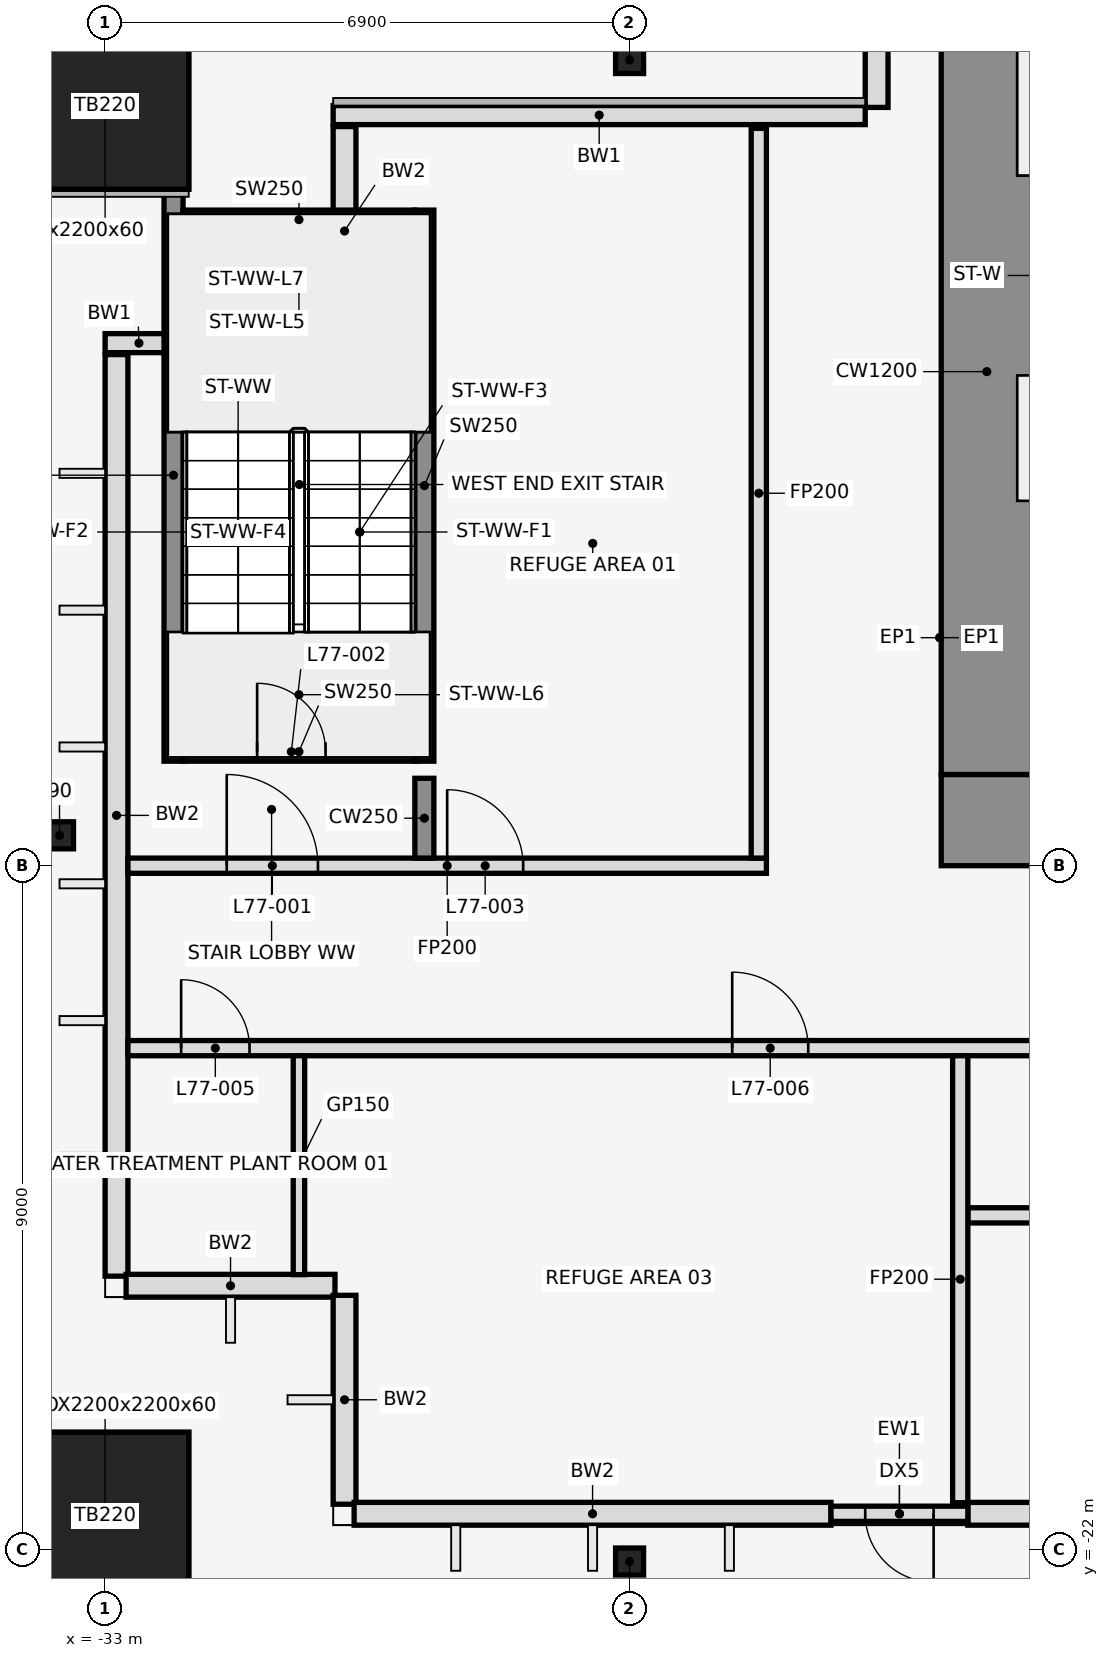
"""IFC4 building model, lengths in metres.
Left out: names, types, materials, properties, quantities, classifications, styles, units other than length and angle.
Written with IfcOpenShell. Run it as: python <this file> out.ifc"""

import sys

from ifc_helpers import new_model, si_unit, direction, frame, frame_2d, origin, origin_2d, place, context, subcontext, project, spatial, rectangle, hollow_rectangle, i_section, extrude, element, fill, save


model = new_model("IFC4")
c1 = context("Model", 3, precision=1e-05, world=origin(), true_north=direction((0.0, 1.0)))
c2 = subcontext(c1, "Body", "Model", "MODEL_VIEW")
j1 = project(units=[si_unit("LENGTHUNIT", "METRE"), si_unit("PLANEANGLEUNIT", "RADIAN")], contexts=[c1])
p1 = place(None, origin())
s1 = spatial("IfcSite", under=j1, at=p1, CompositionType="ELEMENT")
p2 = place(p1, origin())
s2 = spatial("IfcBuilding", under=s1, at=p2, CompositionType="ELEMENT")
p3 = place(p2, frame((0.0, 0.0, 342.5)))
s3 = spatial("IfcBuildingStorey", under=s2, at=p3, CompositionType="ELEMENT", Elevation=342.5)
for number, where, z_axis, x_axis in (
    (1, (-33.0, -21.554, 0.0), (0.0, 0.0, 1.0), (1.0, 0.0, 0.0)),
    (2, (-33.0, -3.0, 0.0), (0.0, 0.0, 1.0), (1.0, 0.0, 0.0)),
):
    element("IfcColumn", number, at=place(p3, frame(where, z_axis=z_axis, x_axis=x_axis)), inside=s3, PredefinedType="COLUMN", context=c2, shape_type="SweptSolid", body=[
        extrude(hollow_rectangle(XDim=2.2, YDim=2.2, WallThickness=0.06, at=origin_2d()), origin(), (0.0, 0.0, 1.0), 4.98),
    ])
for number, where, z_axis, x_axis in (
    (3, (-26.1, -22.154, 0.0), (0.0, 0.0, 1.0), (1.0, 0.0, 0.0)),
    (4, (-26.1, -2.4, 0.0), (0.0, 0.0, 1.0), (1.0, 0.0, 0.0)),
    (5, (-33.6, -12.6, 0.0), (0.0, 0.0, 1.0), (1.0, 0.0, 0.0)),
):
    element("IfcColumn", number, at=place(p3, frame(where, z_axis=z_axis, x_axis=x_axis)), inside=s3, PredefinedType="COLUMN", context=c2, shape_type="SweptSolid", body=[
        extrude(i_section(OverallWidth=0.368, OverallDepth=0.356, WebThickness=0.011, FlangeThickness=0.018, at=origin_2d()), origin(), (0.0, 0.0, 1.0), 5.4),
    ])
for number, where, z_axis, x_axis in (
    (6, (-33.0, -21.554, 4.98), (0.0, 0.0, 1.0), (1.0, 0.0, 0.0)),
    (7, (-33.0, -3.0, 4.98), (0.0, 0.0, 1.0), (1.0, 0.0, 0.0)),
):
    element("IfcColumn", number, at=place(p3, frame(where, z_axis=z_axis, x_axis=x_axis)), inside=s3, PredefinedType="COLUMN", context=c2, shape_type="SweptSolid", body=[
        extrude(rectangle(XDim=2.2, YDim=2.2, at=origin_2d()), origin(), (0.0, 0.0, 1.0), 0.42),
    ])
for number, where, z_axis, x_axis in (
    (8, (-22.85, -0.276, 0.0), (0.0, 0.0, 1.0), (0.0, -1.0, 0.0)),
    (9, (-29.85, -3.276, 0.0), (0.0, 0.0, 1.0), (0.0, -1.0, 0.0)),
):
    element("IfcWall", number, at=place(p3, frame(where, z_axis=z_axis, x_axis=x_axis)), inside=s3, PredefinedType="STANDARD", context=c2, shape_type="SweptSolid", body=[
        extrude(rectangle(XDim=2.748, YDim=0.3, at=frame_2d((1.374, 0.0))), origin(), (0.0, 0.0, 1.0), 5.2),
    ])
p4 = place(p3, frame((-32.85, -6.276, 0.0), z_axis=(0.0, 0.0, 1.0), x_axis=(0.0, -1.0, 0.0)))
e10 = element("IfcWall", 10, at=p4, inside=s3, PredefinedType="STANDARD", context=c2, shape_type="SweptSolid", body=[
    extrude(rectangle(XDim=12.124, YDim=0.3, at=frame_2d((6.062, 0.0))), origin(), (0.0, 0.0, 1.0), 4.288),
])
for number, where, z_axis, x_axis in (
    (11, (-32.724, -18.526, 0.0), (0.0, 0.0, 1.0), (1.0, 0.0, 0.0)),
    (12, (-29.85, -18.652, 0.0), (0.0, 0.0, 1.0), (0.0, -1.0, 0.0)),
):
    element("IfcWall", number, at=place(p3, frame(where, z_axis=z_axis, x_axis=x_axis)), inside=s3, PredefinedType="STANDARD", context=c2, shape_type="SweptSolid", body=[
        extrude(rectangle(XDim=2.748, YDim=0.3, at=frame_2d((1.374, 0.0))), origin(), (0.0, 0.0, 1.0), 4.796),
    ])
p5 = place(p3, frame((-29.724, -21.526, 0.0), z_axis=(0.0, 0.0, 1.0), x_axis=(1.0, 0.0, 0.0)))
e13 = element("IfcWall", 13, at=p5, inside=s3, PredefinedType="STANDARD", context=c2, shape_type="SweptSolid", body=[
    extrude(rectangle(XDim=6.274, YDim=0.3, at=frame_2d((3.137, 0.0))), origin(), (0.0, 0.0, 1.0), 4.796),
])
p6 = place(p3, frame((-21.65, -21.526, 0.0), z_axis=(0.0, 0.0, 1.0), x_axis=(1.0, 0.0, 0.0)))
e14 = element("IfcWall", 14, at=p6, inside=s3, PredefinedType="STANDARD", context=c2, shape_type="SweptSolid", body=[
    extrude(rectangle(XDim=6.035, YDim=0.3, at=frame_2d((3.018, 0.0))), origin(), (0.0, 0.0, 1.0), 4.745),
])
p7 = place(p3, frame((-21.65, -21.526, 0.0), z_axis=(0.0, 0.0, 1.0), x_axis=(-1.0, 0.0, 0.0)))
e15 = element("IfcWall", 15, at=p7, inside=s3, PredefinedType="STANDARD", context=c2, shape_type="SweptSolid", body=[
    extrude(rectangle(XDim=1.8, YDim=0.2, at=frame_2d((0.9, 0.0))), origin(), (0.0, 0.0, 1.0), 5.2),
])
p8 = place(p7, frame((0.45, 0.0, 0.0)))
e16 = element("IfcOpeningElement", 16, at=p8, cuts=e15, PredefinedType="OPENING", context=c2, shape_type="SweptSolid", body=[
    extrude(rectangle(XDim=0.9, YDim=2.1, at=frame_2d((0.45, 1.05))), frame((0.0, 0.112, 0.0), z_axis=(0.0, -1.0, 0.0), x_axis=(1.0, 0.0, 0.0)), (0.0, 0.0, 1.0), 0.224),
])
p9 = place(p3, frame((-23.0, -3.125, 0.0), z_axis=(0.0, 0.0, 1.0), x_axis=(-1.0, 0.0, 0.0)))
e17 = element("IfcWall", 17, at=p9, inside=s3, PredefinedType="STANDARD", context=c2, shape_type="SweptSolid", body=[
    extrude(rectangle(XDim=7.0, YDim=0.25, at=frame_2d((3.5, 0.0))), origin(), (0.0, 0.0, 1.0), 5.2),
])
p10 = place(p3, frame((-32.11, -6.125, 0.0), z_axis=(0.0, 0.0, 1.0), x_axis=(-1.0, 0.0, 0.0)))
e18 = element("IfcWall", 18, at=p10, inside=s3, PredefinedType="STANDARD", context=c2, shape_type="SweptSolid", body=[
    extrude(rectangle(XDim=0.89, YDim=0.25, at=frame_2d((0.445, 0.0))), origin(), (0.0, 0.0, 1.0), 5.2),
])
p11 = place(p3, frame((-32.1, -11.625, 0.0), z_axis=(0.0, 0.0, 1.0), x_axis=(0.0, 1.0, 0.0)))
e19 = element("IfcWall", 19, at=p11, inside=s3, PredefinedType="SHEAR", context=c2, shape_type="SweptSolid", body=[
    extrude(rectangle(XDim=7.525, YDim=0.25, at=frame_2d((3.762, 0.0))), origin(), (0.0, 0.0, 1.0), 5.4),
])
p12 = place(p3, frame((-28.8, -11.625, 0.0), z_axis=(0.0, 0.0, 1.0), x_axis=(0.0, 1.0, 0.0)))
e20 = element("IfcWall", 20, at=p12, inside=s3, PredefinedType="SHEAR", context=c2, shape_type="SweptSolid", body=[
    extrude(rectangle(XDim=7.25, YDim=0.25, at=frame_2d((3.625, 0.0))), origin(), (0.0, 0.0, 1.0), 5.4),
])
p13 = place(p3, frame((-31.975, -11.5, 0.0), z_axis=(0.0, 0.0, 1.0), x_axis=(1.0, 0.0, 0.0)))
e21 = element("IfcWall", 21, at=p13, inside=s3, PredefinedType="SHEAR", context=c2, shape_type="SweptSolid", body=[
    extrude(rectangle(XDim=3.05, YDim=0.25, at=frame_2d((1.525, 0.0))), origin(), (0.0, 0.0, 1.0), 5.4),
])
p14 = place(p13, frame((0.975, 0.0, 0.0)))
e22 = element("IfcOpeningElement", 22, at=p14, cuts=e21, PredefinedType="OPENING", context=c2, shape_type="SweptSolid", body=[
    extrude(rectangle(XDim=0.9, YDim=2.1, at=frame_2d((0.45, 1.05))), frame((0.0, 0.137, 0.0), z_axis=(0.0, -1.0, 0.0), x_axis=(1.0, 0.0, 0.0)), (0.0, 0.0, 1.0), 0.274),
])
p15 = place(p3, frame((-31.975, -4.5, 0.0), z_axis=(0.0, 0.0, 1.0), x_axis=(1.0, 0.0, 0.0)))
e23 = element("IfcWall", 23, at=p15, inside=s3, PredefinedType="SHEAR", context=c2, shape_type="SweptSolid", body=[
    extrude(rectangle(XDim=3.05, YDim=0.25, at=frame_2d((1.525, 0.0))), origin(), (0.0, 0.0, 1.0), 5.4),
])
p16 = place(p3, frame((-21.65, -17.6, 0.0), z_axis=(0.0, 0.0, 1.0), x_axis=(1.0, 0.0, 0.0)))
e24 = element("IfcWall", 24, at=p16, inside=s3, PredefinedType="PARTITIONING", context=c2, shape_type="SweptSolid", body=[
    extrude(rectangle(XDim=8.5, YDim=0.2, at=frame_2d((4.25, 0.0))), origin(), (0.0, 0.0, 1.0), 4.268),
])
p17 = place(p16, frame((1.1, 0.0, 0.0)))
e25 = element("IfcOpeningElement", 25, at=p17, cuts=e24, PredefinedType="OPENING", context=c2, shape_type="SweptSolid", body=[
    extrude(rectangle(XDim=0.9, YDim=2.1, at=frame_2d((0.45, 1.05))), frame((0.0, 0.112, 0.0), z_axis=(0.0, -1.0, 0.0), x_axis=(1.0, 0.0, 0.0)), (0.0, 0.0, 1.0), 0.224),
])
p18 = place(p16, frame((4.3, 0.0, 0.0)))
e26 = element("IfcOpeningElement", 26, at=p18, cuts=e24, PredefinedType="OPENING", context=c2, shape_type="SweptSolid", body=[
    extrude(rectangle(XDim=0.9, YDim=2.1, at=frame_2d((0.45, 1.05))), frame((0.0, 0.112, 0.0), z_axis=(0.0, -1.0, 0.0), x_axis=(1.0, 0.0, 0.0)), (0.0, 0.0, 1.0), 0.224),
])
p19 = place(p16, frame((6.9, 0.0, 0.0)))
e27 = element("IfcOpeningElement", 27, at=p19, cuts=e24, PredefinedType="OPENING", context=c2, shape_type="SweptSolid", body=[
    extrude(rectangle(XDim=1.0, YDim=2.1, at=frame_2d((0.5, 1.05))), frame((0.0, 0.112, 0.0), z_axis=(0.0, -1.0, 0.0), x_axis=(1.0, 0.0, 0.0)), (0.0, 0.0, 1.0), 0.224),
])
p20 = place(p3, frame((-32.7, -15.4, 0.0), z_axis=(0.0, 0.0, 1.0), x_axis=(1.0, 0.0, 0.0)))
e28 = element("IfcWall", 28, at=p20, inside=s3, PredefinedType="PARTITIONING", context=c2, shape_type="SweptSolid", body=[
    extrude(rectangle(XDim=65.4, YDim=0.2, at=frame_2d((32.7, 0.0))), origin(), (0.0, 0.0, 1.0), 4.268),
])
p21 = place(p20, frame((0.7, 0.0, 0.0)))
e29 = element("IfcOpeningElement", 29, at=p21, cuts=e28, PredefinedType="OPENING", context=c2, shape_type="SweptSolid", body=[
    extrude(rectangle(XDim=0.9, YDim=2.1, at=frame_2d((0.45, 1.05))), frame((0.0, 0.112, 0.0), z_axis=(0.0, -1.0, 0.0), x_axis=(1.0, 0.0, 0.0)), (0.0, 0.0, 1.0), 0.224),
])
p22 = place(p20, frame((7.95, 0.0, 0.0)))
e30 = element("IfcOpeningElement", 30, at=p22, cuts=e28, PredefinedType="OPENING", context=c2, shape_type="SweptSolid", body=[
    extrude(rectangle(XDim=1.0, YDim=2.1, at=frame_2d((0.5, 1.05))), frame((0.0, 0.112, 0.0), z_axis=(0.0, -1.0, 0.0), x_axis=(1.0, 0.0, 0.0)), (0.0, 0.0, 1.0), 0.224),
])
p23 = place(p20, frame((14.85, 0.0, 0.0)))
e31 = element("IfcOpeningElement", 31, at=p23, cuts=e28, PredefinedType="OPENING", context=c2, shape_type="SweptSolid", body=[
    extrude(rectangle(XDim=0.9, YDim=2.1, at=frame_2d((0.45, 1.05))), frame((0.0, 0.112, 0.0), z_axis=(0.0, -1.0, 0.0), x_axis=(1.0, 0.0, 0.0)), (0.0, 0.0, 1.0), 0.224),
])
p24 = place(p20, frame((23.55, 0.0, 0.0)))
e32 = element("IfcOpeningElement", 32, at=p24, cuts=e28, PredefinedType="OPENING", context=c2, shape_type="SweptSolid", body=[
    extrude(rectangle(XDim=1.0, YDim=2.1, at=frame_2d((0.5, 1.05))), frame((0.0, 0.112, 0.0), z_axis=(0.0, -1.0, 0.0), x_axis=(1.0, 0.0, 0.0)), (0.0, 0.0, 1.0), 0.224),
])
p25 = place(p20, frame((32.15, 0.0, 0.0)))
e33 = element("IfcOpeningElement", 33, at=p25, cuts=e28, PredefinedType="OPENING", context=c2, shape_type="SweptSolid", body=[
    extrude(rectangle(XDim=1.0, YDim=2.1, at=frame_2d((0.5, 1.05))), frame((0.0, 0.112, 0.0), z_axis=(0.0, -1.0, 0.0), x_axis=(1.0, 0.0, 0.0)), (0.0, 0.0, 1.0), 0.224),
])
p26 = place(p20, frame((40.95, 0.0, 0.0)))
e34 = element("IfcOpeningElement", 34, at=p26, cuts=e28, PredefinedType="OPENING", context=c2, shape_type="SweptSolid", body=[
    extrude(rectangle(XDim=1.0, YDim=2.1, at=frame_2d((0.5, 1.05))), frame((0.0, 0.112, 0.0), z_axis=(0.0, -1.0, 0.0), x_axis=(1.0, 0.0, 0.0)), (0.0, 0.0, 1.0), 0.224),
])
p27 = place(p20, frame((49.55, 0.0, 0.0)))
e35 = element("IfcOpeningElement", 35, at=p27, cuts=e28, PredefinedType="OPENING", context=c2, shape_type="SweptSolid", body=[
    extrude(rectangle(XDim=1.0, YDim=2.1, at=frame_2d((0.5, 1.05))), frame((0.0, 0.112, 0.0), z_axis=(0.0, -1.0, 0.0), x_axis=(1.0, 0.0, 0.0)), (0.0, 0.0, 1.0), 0.224),
])
p28 = place(p20, frame((56.45, 0.0, 0.0)))
e36 = element("IfcOpeningElement", 36, at=p28, cuts=e28, PredefinedType="OPENING", context=c2, shape_type="SweptSolid", body=[
    extrude(rectangle(XDim=1.0, YDim=2.1, at=frame_2d((0.5, 1.05))), frame((0.0, 0.112, 0.0), z_axis=(0.0, -1.0, 0.0), x_axis=(1.0, 0.0, 0.0)), (0.0, 0.0, 1.0), 0.224),
])
p29 = place(p20, frame((63.85, 0.0, 0.0)))
e37 = element("IfcOpeningElement", 37, at=p29, cuts=e28, PredefinedType="OPENING", context=c2, shape_type="SweptSolid", body=[
    extrude(rectangle(XDim=0.9, YDim=2.1, at=frame_2d((0.45, 1.05))), frame((0.0, 0.112, 0.0), z_axis=(0.0, -1.0, 0.0), x_axis=(1.0, 0.0, 0.0)), (0.0, 0.0, 1.0), 0.224),
])
p30 = place(p3, frame((-32.7, -13.0, 0.0), z_axis=(0.0, 0.0, 1.0), x_axis=(1.0, 0.0, 0.0)))
e38 = element("IfcWall", 38, at=p30, inside=s3, PredefinedType="PARTITIONING", context=c2, shape_type="SweptSolid", body=[
    extrude(rectangle(XDim=8.4, YDim=0.2, at=frame_2d((4.2, 0.0))), origin(), (0.0, 0.0, 1.0), 4.268),
])
p31 = place(p30, frame((1.3, 0.0, 0.0)))
e39 = element("IfcOpeningElement", 39, at=p31, cuts=e38, PredefinedType="OPENING", context=c2, shape_type="SweptSolid", body=[
    extrude(rectangle(XDim=1.2, YDim=2.1, at=frame_2d((0.6, 1.05))), frame((0.0, 0.112, 0.0), z_axis=(0.0, -1.0, 0.0), x_axis=(1.0, 0.0, 0.0)), (0.0, 0.0, 1.0), 0.224),
])
p32 = place(p30, frame((4.2, 0.0, 0.0)))
e40 = element("IfcOpeningElement", 40, at=p32, cuts=e38, PredefinedType="OPENING", context=c2, shape_type="SweptSolid", body=[
    extrude(rectangle(XDim=1.0, YDim=2.1, at=frame_2d((0.5, 1.05))), frame((0.0, 0.112, 0.0), z_axis=(0.0, -1.0, 0.0), x_axis=(1.0, 0.0, 0.0)), (0.0, 0.0, 1.0), 0.224),
])
p33 = place(p3, frame((-30.45, -18.38, 0.0), z_axis=(0.0, 0.0, 1.0), x_axis=(0.0, 1.0, 0.0)))
e41 = element("IfcWall", 41, at=p33, inside=s3, PredefinedType="PARTITIONING", context=c2, shape_type="SweptSolid", body=[
    extrude(rectangle(XDim=2.88, YDim=0.15, at=frame_2d((1.44, 0.0))), origin(), (0.0, 0.0, 1.0), 4.268),
])
p34 = place(p3, frame((-28.8, -12.9, 0.0), z_axis=(0.0, 0.0, 1.0), x_axis=(0.0, 1.0, 0.0)))
e42 = element("IfcWall", 42, at=p34, inside=s3, PredefinedType="SHEAR", context=c2, shape_type="SweptSolid", body=[
    extrude(rectangle(XDim=1.05, YDim=0.25, at=frame_2d((0.525, 0.0))), origin(), (0.0, 0.0, 1.0), 5.4),
])
p35 = place(p3, frame((-24.4, -12.9, 0.0), z_axis=(0.0, 0.0, 1.0), x_axis=(0.0, 1.0, 0.0)))
e43 = element("IfcWall", 43, at=p35, inside=s3, PredefinedType="PARTITIONING", context=c2, shape_type="SweptSolid", body=[
    extrude(rectangle(XDim=9.6, YDim=0.2, at=frame_2d((4.8, 0.0))), origin(), (0.0, 0.0, 1.0), 4.268),
])
p36 = place(p3, frame((-21.75, -21.38, 0.0), z_axis=(0.0, 0.0, 1.0), x_axis=(0.0, 1.0, 0.0)))
e44 = element("IfcWall", 44, at=p36, inside=s3, PredefinedType="PARTITIONING", context=c2, shape_type="SweptSolid", body=[
    extrude(rectangle(XDim=5.88, YDim=0.2, at=frame_2d((2.94, 0.0))), origin(), (0.0, 0.0, 1.0), 4.268),
])
p37 = place(p3, frame((-22.0, -12.4, 0.0), z_axis=(0.0, 0.0, 1.0), x_axis=(1.0, 0.0, 0.0)))
e45 = element("IfcWall", 45, at=p37, inside=s3, PredefinedType="SHEAR", context=c2, shape_type="SweptSolid", body=[
    extrude(rectangle(XDim=44.0, YDim=1.2, at=frame_2d((22.0, 0.0))), origin(), (0.0, 0.0, 1.0), 5.4),
])
p38 = place(p37, frame((2.2, 0.0, 0.0)))
e46 = element("IfcOpeningElement", 46, at=p38, cuts=e45, PredefinedType="OPENING", context=c2, shape_type="SweptSolid", body=[
    extrude(rectangle(XDim=1.2, YDim=2.1, at=frame_2d((0.6, 1.05))), frame((0.0, 0.612, 0.0), z_axis=(0.0, -1.0, 0.0), x_axis=(1.0, 0.0, 0.0)), (0.0, 0.0, 1.0), 1.224),
])
p39 = place(p37, frame((21.4, 0.0, 0.0)))
e47 = element("IfcOpeningElement", 47, at=p39, cuts=e45, PredefinedType="OPENING", context=c2, shape_type="SweptSolid", body=[
    extrude(rectangle(XDim=1.2, YDim=2.1, at=frame_2d((0.6, 1.05))), frame((0.0, 0.612, 0.0), z_axis=(0.0, -1.0, 0.0), x_axis=(1.0, 0.0, 0.0)), (0.0, 0.0, 1.0), 1.224),
])
p40 = place(p37, frame((40.6, 0.0, 0.0)))
e48 = element("IfcOpeningElement", 48, at=p40, cuts=e45, PredefinedType="OPENING", context=c2, shape_type="SweptSolid", body=[
    extrude(rectangle(XDim=1.2, YDim=2.1, at=frame_2d((0.6, 1.05))), frame((0.0, 0.612, 0.0), z_axis=(0.0, -1.0, 0.0), x_axis=(1.0, 0.0, 0.0)), (0.0, 0.0, 1.0), 1.224),
])
p41 = place(p37, frame((10.75, 0.0, 0.0)))
e49 = element("IfcOpeningElement", 49, at=p41, cuts=e45, PredefinedType="OPENING", context=c2, shape_type="SweptSolid", body=[
    extrude(rectangle(XDim=1.2, YDim=2.1, at=frame_2d((0.6, 1.05))), frame((0.0, 0.612, 0.0), z_axis=(0.0, -1.0, 0.0), x_axis=(1.0, 0.0, 0.0)), (0.0, 0.0, 1.0), 1.224),
])
p42 = place(p37, frame((16.0, 0.0, 0.0)))
e50 = element("IfcOpeningElement", 50, at=p42, cuts=e45, PredefinedType="OPENING", context=c2, shape_type="SweptSolid", body=[
    extrude(rectangle(XDim=1.8, YDim=2.1, at=frame_2d((0.9, 1.05))), frame((0.0, 0.612, 0.0), z_axis=(0.0, -1.0, 0.0), x_axis=(1.0, 0.0, 0.0)), (0.0, 0.0, 1.0), 1.224),
])
p43 = place(p37, frame((6.3, 0.0, 0.0)))
e51 = element("IfcOpeningElement", 51, at=p43, cuts=e45, PredefinedType="OPENING", context=c2, shape_type="SweptSolid", body=[
    extrude(rectangle(XDim=1.2, YDim=2.1, at=frame_2d((0.6, 1.05))), frame((0.0, 0.612, 0.0), z_axis=(0.0, -1.0, 0.0), x_axis=(1.0, 0.0, 0.0)), (0.0, 0.0, 1.0), 1.224),
])
p44 = place(p37, frame((26.2, 0.0, 0.0)))
e52 = element("IfcOpeningElement", 52, at=p44, cuts=e45, PredefinedType="OPENING", context=c2, shape_type="SweptSolid", body=[
    extrude(rectangle(XDim=1.8, YDim=2.1, at=frame_2d((0.9, 1.05))), frame((0.0, 0.612, 0.0), z_axis=(0.0, -1.0, 0.0), x_axis=(1.0, 0.0, 0.0)), (0.0, 0.0, 1.0), 1.224),
])
p45 = place(p37, frame((36.5, 0.0, 0.0)))
e53 = element("IfcOpeningElement", 53, at=p45, cuts=e45, PredefinedType="OPENING", context=c2, shape_type="SweptSolid", body=[
    extrude(rectangle(XDim=1.2, YDim=2.1, at=frame_2d((0.6, 1.05))), frame((0.0, 0.612, 0.0), z_axis=(0.0, -1.0, 0.0), x_axis=(1.0, 0.0, 0.0)), (0.0, 0.0, 1.0), 1.224),
])
p46 = place(p3, frame((-21.4, -11.8, 0.0), z_axis=(0.0, 0.0, 1.0), x_axis=(0.0, 1.0, 0.0)))
e54 = element("IfcWall", 54, at=p46, inside=s3, PredefinedType="SHEAR", context=c2, shape_type="SweptSolid", body=[
    extrude(rectangle(XDim=10.6, YDim=1.2, at=frame_2d((5.3, 0.0))), origin(), (0.0, 0.0, 1.0), 5.4),
])
p47 = place(p8, origin())
e55 = element("IfcDoor", 55, at=p47, inside=s3, OperationType="SINGLE_SWING_LEFT", PredefinedType="DOOR", context=c2, shape_type="SweptSolid", body=[
    extrude(rectangle(XDim=0.9, YDim=2.1, at=frame_2d((0.45, 1.05))), frame((0.0, 0.025, 0.0), z_axis=(0.0, -1.0, 0.0), x_axis=(1.0, 0.0, 0.0)), (0.0, 0.0, 1.0), 0.05),
])
fill(e16, e55)
p48 = place(p31, origin())
e56 = element("IfcDoor", 56, at=p48, inside=s3, OperationType="SINGLE_SWING_LEFT", PredefinedType="DOOR", context=c2, shape_type="SweptSolid", body=[
    extrude(rectangle(XDim=1.2, YDim=2.1, at=frame_2d((0.6, 1.05))), frame((0.0, 0.025, 0.0), z_axis=(0.0, -1.0, 0.0), x_axis=(1.0, 0.0, 0.0)), (0.0, 0.0, 1.0), 0.05),
])
fill(e39, e56)
p49 = place(p14, origin())
e57 = element("IfcDoor", 57, at=p49, inside=s3, OperationType="SINGLE_SWING_LEFT", PredefinedType="DOOR", context=c2, shape_type="SweptSolid", body=[
    extrude(rectangle(XDim=0.9, YDim=2.1, at=frame_2d((0.45, 1.05))), frame((0.0, 0.025, 0.0), z_axis=(0.0, -1.0, 0.0), x_axis=(1.0, 0.0, 0.0)), (0.0, 0.0, 1.0), 0.05),
])
fill(e22, e57)
p50 = place(p32, origin())
e58 = element("IfcDoor", 58, at=p50, inside=s3, OperationType="SINGLE_SWING_RIGHT", PredefinedType="DOOR", context=c2, shape_type="SweptSolid", body=[
    extrude(rectangle(XDim=1.0, YDim=2.1, at=frame_2d((0.5, 1.05))), frame((0.0, 0.025, 0.0), z_axis=(0.0, -1.0, 0.0), x_axis=(1.0, 0.0, 0.0)), (0.0, 0.0, 1.0), 0.05),
])
fill(e40, e58)
p51 = place(p21, frame((0.9, 0.0, 0.0), z_axis=(0.0, 0.0, 1.0), x_axis=(-1.0, 0.0, 0.0)))
e59 = element("IfcDoor", 59, at=p51, inside=s3, OperationType="SINGLE_SWING_RIGHT", PredefinedType="DOOR", context=c2, shape_type="SweptSolid", body=[
    extrude(rectangle(XDim=0.9, YDim=2.1, at=frame_2d((0.45, 1.05))), frame((0.0, 0.025, 0.0), z_axis=(0.0, -1.0, 0.0), x_axis=(1.0, 0.0, 0.0)), (0.0, 0.0, 1.0), 0.05),
])
fill(e29, e59)
p52 = place(p22, frame((1.0, 0.0, 0.0), z_axis=(0.0, 0.0, 1.0), x_axis=(-1.0, 0.0, 0.0)))
e60 = element("IfcDoor", 60, at=p52, inside=s3, OperationType="SINGLE_SWING_RIGHT", PredefinedType="DOOR", context=c2, shape_type="SweptSolid", body=[
    extrude(rectangle(XDim=1.0, YDim=2.1, at=frame_2d((0.5, 1.05))), frame((0.0, 0.025, 0.0), z_axis=(0.0, -1.0, 0.0), x_axis=(1.0, 0.0, 0.0)), (0.0, 0.0, 1.0), 0.05),
])
fill(e30, e60)
save(model, sys.argv[1])
